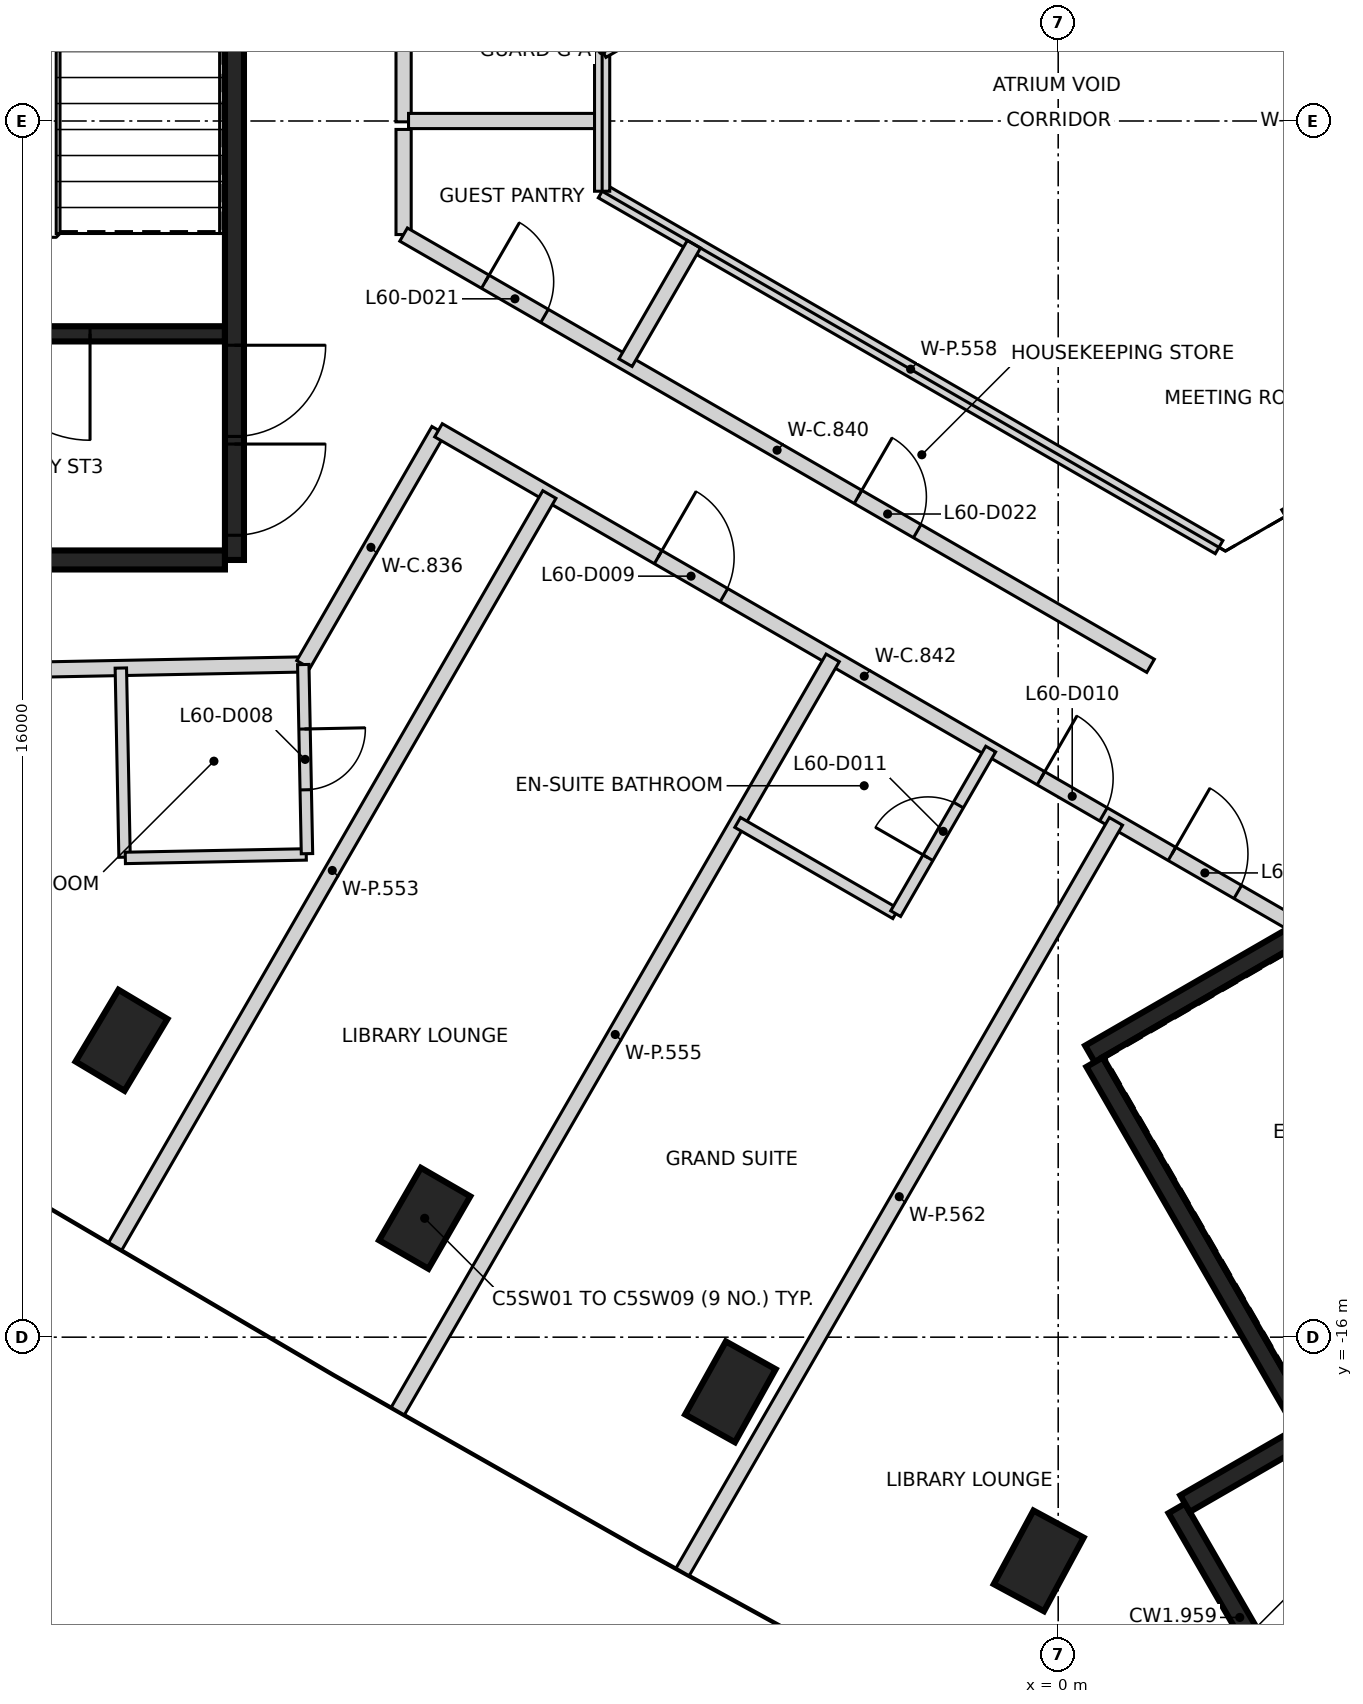
"""IFC4 building model, lengths in metres.
Left out: names, types, materials, properties, quantities, classifications, styles, units other than length and angle.
Written with IfcOpenShell. Run it as: python <this file> out.ifc"""

import sys

from ifc_helpers import new_model, si_unit, direction, frame, frame_2d, origin, origin_2d, place, context, subcontext, project, spatial, rectangle, extrude, element, fill, save


model = new_model("IFC4")
c1 = context("Model", 3, precision=1e-05, world=origin(), true_north=direction((0.0, 1.0)))
c2 = subcontext(c1, "Body", "Model", "MODEL_VIEW")
j1 = project(units=[si_unit("LENGTHUNIT", "METRE"), si_unit("PLANEANGLEUNIT", "RADIAN")], contexts=[c1])
p1 = place(None, origin())
s1 = spatial("IfcSite", under=j1, at=p1, CompositionType="ELEMENT")
p2 = place(p1, origin())
s2 = spatial("IfcBuilding", under=s1, at=p2, CompositionType="ELEMENT")
p3 = place(p2, frame((0.0, 0.0, 239.4)))
s3 = spatial("IfcBuildingStorey", under=s2, at=p3, CompositionType="ELEMENT", Elevation=239.4)
for number, where, z_axis, x_axis in (
    (1, (-12.323, -12.094, -0.35), (0.0, 0.0, 1.0), (0.513, 0.858, 0.0)),
    (2, (-8.335, -14.436, -0.35), (0.0, 0.0, 1.0), (0.5, 0.866, 0.0)),
    (3, (-4.312, -16.719, -0.35), (0.0, 0.0, 1.0), (0.487, 0.873, 0.0)),
    (4, (-0.256, -18.943, -0.35), (0.0, 0.0, 1.0), (0.475, 0.88, 0.0)),
):
    element("IfcColumn", number, at=place(p3, frame(where, z_axis=z_axis, x_axis=x_axis)), inside=s3, PredefinedType="COLUMN", context=c2, shape_type="SweptSolid", body=[
        extrude(rectangle(XDim=1.1, YDim=0.75, at=origin_2d()), origin(), (0.0, 0.0, 1.0), 3.6),
    ])
p4 = place(p3, frame((-10.837, 5.775, 0.0), z_axis=(0.0, 0.0, 1.0), x_axis=(0.0, -1.0, 0.0)))
e5 = element("IfcWall", 5, at=p4, inside=s3, PredefinedType="SHEAR", context=c2, shape_type="SweptSolid", body=[
    extrude(rectangle(XDim=11.55, YDim=0.25, at=frame_2d((5.775, 0.0))), origin(), (0.0, 0.0, 1.0), 3.25),
])
p5 = place(p4, frame((10.025, 0.0, 0.0)))
e6 = element("IfcOpeningElement", 6, at=p5, cuts=e5, PredefinedType="OPENING", context=c2, shape_type="SweptSolid", body=[
    extrude(rectangle(XDim=1.2, YDim=2.1, at=frame_2d((0.6, 1.05))), frame((0.0, 0.135, 0.0), z_axis=(0.0, -1.0, 0.0), x_axis=(1.0, 0.0, 0.0)), (0.0, 0.0, 1.0), 0.27),
])
p6 = place(p4, frame((8.725, 0.0, 0.0)))
e7 = element("IfcOpeningElement", 7, at=p6, cuts=e5, PredefinedType="OPENING", context=c2, shape_type="SweptSolid", body=[
    extrude(rectangle(XDim=1.2, YDim=2.1, at=frame_2d((0.6, 1.05))), frame((0.0, 0.135, 0.0), z_axis=(0.0, -1.0, 0.0), x_axis=(1.0, 0.0, 0.0)), (0.0, 0.0, 1.0), 0.27),
])
p7 = place(p3, frame((-10.963, -5.775, 0.0), z_axis=(0.0, 0.0, 1.0), x_axis=(-1.0, 0.0, 0.0)))
e8 = element("IfcWall", 8, at=p7, inside=s3, PredefinedType="SHEAR", context=c2, shape_type="SweptSolid", body=[
    extrude(rectangle(XDim=5.225, YDim=0.25, at=frame_2d((2.612, 0.0))), origin(), (0.0, 0.0, 1.0), 3.25),
])
p8 = place(p3, frame((-10.963, -2.8, 0.0), z_axis=(0.0, 0.0, 1.0), x_axis=(-1.0, 0.0, 0.0)))
e9 = element("IfcWall", 9, at=p8, inside=s3, PredefinedType="SHEAR", context=c2, shape_type="SweptSolid", body=[
    extrude(rectangle(XDim=5.098, YDim=0.2, at=frame_2d((2.549, 0.0))), origin(), (0.0, 0.0, 1.0), 3.25),
])
p9 = place(p8, frame((1.774, 0.0, 0.0)))
e10 = element("IfcOpeningElement", 10, at=p9, cuts=e9, PredefinedType="OPENING", context=c2, shape_type="SweptSolid", body=[
    extrude(rectangle(XDim=1.4, YDim=2.1, at=frame_2d((0.7, 1.05))), frame((0.0, 0.11, 0.0), z_axis=(0.0, -1.0, 0.0), x_axis=(1.0, 0.0, 0.0)), (0.0, 0.0, 1.0), 0.22),
])
p10 = place(p3, frame((0.417, -12.273, 0.0), z_axis=(0.0, 0.0, 1.0), x_axis=(0.866021906294, 0.500006057782, 0.0)))
e11 = element("IfcWall", 11, at=p10, inside=s3, PredefinedType="SHEAR", context=c2, shape_type="SweptSolid", body=[
    extrude(rectangle(XDim=11.55, YDim=0.25, at=frame_2d((5.775, 0.0))), origin(), (0.0, 0.0, 1.0), 3.25),
])
p11 = place(p10, frame((10.025, 0.0, 0.0)))
e12 = element("IfcOpeningElement", 12, at=p11, cuts=e11, PredefinedType="OPENING", context=c2, shape_type="SweptSolid", body=[
    extrude(rectangle(XDim=1.2, YDim=2.1, at=frame_2d((0.6, 1.05))), frame((0.0, 0.135, 0.0), z_axis=(0.0, -1.0, 0.0), x_axis=(1.0, 0.0, 0.0)), (0.0, 0.0, 1.0), 0.27),
])
p12 = place(p10, frame((8.725, 0.0, 0.0)))
e13 = element("IfcOpeningElement", 13, at=p12, cuts=e11, PredefinedType="OPENING", context=c2, shape_type="SweptSolid", body=[
    extrude(rectangle(XDim=1.2, YDim=2.1, at=frame_2d((0.6, 1.05))), frame((0.0, 0.135, 0.0), z_axis=(0.0, -1.0, 0.0), x_axis=(1.0, 0.0, 0.0)), (0.0, 0.0, 1.0), 0.27),
])
p13 = place(p3, frame((3.235, -17.153, 0.0), z_axis=(0.0, 0.0, 1.0), x_axis=(-0.500008851346, 0.866020293397, 0.0)))
e14 = element("IfcWall", 14, at=p13, inside=s3, PredefinedType="SHEAR", context=c2, shape_type="SweptSolid", body=[
    extrude(rectangle(XDim=5.51, YDim=0.25, at=frame_2d((2.755, 0.0))), origin(), (0.0, 0.0, 1.0), 3.25),
])
p14 = place(p3, frame((3.217, -21.122, 0.0), z_axis=(0.0, 0.0, 1.0), x_axis=(-0.499998874531, 0.866026053573, 0.0)))
e15 = element("IfcWall", 15, at=p14, inside=s3, PredefinedType="SHEAR", context=c2, shape_type="SweptSolid", body=[
    extrude(rectangle(XDim=3.313, YDim=0.25, at=frame_2d((1.656, 0.0))), origin(), (0.0, 0.0, 1.0), 3.25),
])
p15 = place(p3, frame((1.669, -18.19, 0.0), z_axis=(0.0, 0.0, 1.0), x_axis=(0.866042235819, 0.499970844928, 0.0)))
e16 = element("IfcWall", 16, at=p15, inside=s3, PredefinedType="SHEAR", context=c2, shape_type="SweptSolid", body=[
    extrude(rectangle(XDim=2.865, YDim=0.25, at=frame_2d((1.432, 0.0))), origin(), (0.0, 0.0, 1.0), 3.25),
])
p16 = place(p3, frame((-19.149, -7.329, 0.0), z_axis=(0.0, 0.0, 1.0), x_axis=(0.999810023919, 0.019491435849, 0.0)))
e17 = element("IfcWall", 17, at=p16, inside=s3, PredefinedType="PARTITIONING", context=c2, shape_type="SweptSolid", body=[
    extrude(rectangle(XDim=9.219, YDim=0.2, at=frame_2d((4.609, 0.0))), origin(), (0.0, 0.0, 1.0), 3.25),
])
p17 = place(p16, frame((3.23, 0.0, 0.0)))
e18 = element("IfcOpeningElement", 18, at=p17, cuts=e17, PredefinedType="OPENING", context=c2, shape_type="SweptSolid", body=[
    extrude(rectangle(XDim=0.95, YDim=2.1, at=frame_2d((0.475, 1.05))), frame((0.0, 0.11, 0.0), z_axis=(0.0, -1.0, 0.0), x_axis=(1.0, 0.0, 0.0)), (0.0, 0.0, 1.0), 0.22),
])
p18 = place(p3, frame((-9.931, -7.149, 0.0), z_axis=(0.0, 0.0, 1.0), x_axis=(0.499934418432, 0.86606326401, 0.0)))
e19 = element("IfcWall", 19, at=p18, inside=s3, PredefinedType="PARTITIONING", context=c2, shape_type="SweptSolid", body=[
    extrude(rectangle(XDim=3.556, YDim=0.2, at=frame_2d((1.778, 0.0))), origin(), (0.0, 0.0, 1.0), 3.25),
])
p19 = place(p3, frame((-8.612, -1.494, 0.0), z_axis=(0.0, 0.0, 1.0), x_axis=(0.0, 1.0, 0.0)))
e20 = element("IfcWall", 20, at=p19, inside=s3, PredefinedType="PARTITIONING", context=c2, shape_type="SweptSolid", body=[
    extrude(rectangle(XDim=1.383, YDim=0.2, at=frame_2d((0.691, 0.0))), origin(), (0.0, 0.0, 1.0), 3.25),
])
p20 = place(p3, frame((-8.612, -1.494, 0.0), z_axis=(0.0, 0.0, 1.0), x_axis=(0.866035468681, -0.499982566683, 0.0)))
e21 = element("IfcWall", 21, at=p20, inside=s3, PredefinedType="PARTITIONING", context=c2, shape_type="SweptSolid", body=[
    extrude(rectangle(XDim=11.348, YDim=0.2, at=frame_2d((5.674, 0.0))), origin(), (0.0, 0.0, 1.0), 3.25),
])
p21 = place(p20, frame((1.241, 0.0, 0.0)))
e22 = element("IfcOpeningElement", 22, at=p21, cuts=e21, PredefinedType="OPENING", context=c2, shape_type="SweptSolid", body=[
    extrude(rectangle(XDim=0.9, YDim=2.1, at=frame_2d((0.45, 1.05))), frame((0.0, 0.11, 0.0), z_axis=(0.0, -1.0, 0.0), x_axis=(1.0, 0.0, 0.0)), (0.0, 0.0, 1.0), 0.22),
])
p22 = place(p20, frame((6.903, 0.0, 0.0)))
e23 = element("IfcOpeningElement", 23, at=p22, cuts=e21, PredefinedType="OPENING", context=c2, shape_type="SweptSolid", body=[
    extrude(rectangle(XDim=0.9, YDim=2.1, at=frame_2d((0.45, 1.05))), frame((0.0, 0.11, 0.0), z_axis=(0.0, -1.0, 0.0), x_axis=(1.0, 0.0, 0.0)), (0.0, 0.0, 1.0), 0.22),
])
p23 = place(p3, frame((-8.612, -0.011, 0.0), z_axis=(0.0, 0.0, 1.0), x_axis=(0.0, 1.0, 0.0)))
e24 = element("IfcWall", 24, at=p23, inside=s3, PredefinedType="PARTITIONING", context=c2, shape_type="SweptSolid", body=[
    extrude(rectangle(XDim=1.505, YDim=0.2, at=frame_2d((0.752, 0.0))), origin(), (0.0, 0.0, 1.0), 3.25),
])
p24 = place(p3, frame((-8.153, -4.069, 0.0), z_axis=(0.0, 0.0, 1.0), x_axis=(0.865955522833, -0.500121017829, 0.0)))
e25 = element("IfcWall", 25, at=p24, inside=s3, PredefinedType="PARTITIONING", context=c2, shape_type="SweptSolid", body=[
    extrude(rectangle(XDim=12.937, YDim=0.2, at=frame_2d((6.469, 0.0))), origin(), (0.0, 0.0, 1.0), 3.25),
])
p25 = place(p24, frame((3.337, 0.0, 0.0)))
e26 = element("IfcOpeningElement", 26, at=p25, cuts=e25, PredefinedType="OPENING", context=c2, shape_type="SweptSolid", body=[
    extrude(rectangle(XDim=1.0, YDim=2.1, at=frame_2d((0.5, 1.05))), frame((0.0, 0.11, 0.0), z_axis=(0.0, -1.0, 0.0), x_axis=(1.0, 0.0, 0.0)), (0.0, 0.0, 1.0), 0.22),
])
p26 = place(p24, frame((9.153, 0.0, 0.0)))
e27 = element("IfcOpeningElement", 27, at=p26, cuts=e25, PredefinedType="OPENING", context=c2, shape_type="SweptSolid", body=[
    extrude(rectangle(XDim=0.95, YDim=2.1, at=frame_2d((0.475, 1.05))), frame((0.0, 0.11, 0.0), z_axis=(0.0, -1.0, 0.0), x_axis=(1.0, 0.0, 0.0)), (0.0, 0.0, 1.0), 0.22),
])
p27 = place(p24, frame((11.144, 0.0, 0.0)))
e28 = element("IfcOpeningElement", 28, at=p27, cuts=e25, PredefinedType="OPENING", context=c2, shape_type="SweptSolid", body=[
    extrude(rectangle(XDim=1.0, YDim=2.1, at=frame_2d((0.5, 1.05))), frame((0.0, 0.11, 0.0), z_axis=(0.0, -1.0, 0.0), x_axis=(1.0, 0.0, 0.0)), (0.0, 0.0, 1.0), 0.22),
])
p28 = place(p3, frame((-12.407, -14.806, 0.0), z_axis=(0.0, 0.0, 1.0), x_axis=(0.500104175471, 0.865965249693, 0.0)))
e29 = element("IfcWall", 29, at=p28, inside=s3, PredefinedType="PARTITIONING", context=c2, shape_type="SweptSolid", body=[
    extrude(rectangle(XDim=11.423, YDim=0.2, at=frame_2d((5.711, 0.0))), origin(), (0.0, 0.0, 1.0), 2.35),
])
p29 = place(p3, frame((-8.688, -16.973, 0.0), z_axis=(0.0, 0.0, 1.0), x_axis=(0.500021643343, 0.866012907634, 0.0)))
e30 = element("IfcWall", 30, at=p29, inside=s3, PredefinedType="PARTITIONING", context=c2, shape_type="SweptSolid", body=[
    extrude(rectangle(XDim=11.443, YDim=0.2, at=frame_2d((5.721, 0.0))), origin(), (0.0, 0.0, 1.0), 2.35),
])
p30 = place(p3, frame((-8.547, 0.0, 0.0), z_axis=(0.0, 0.0, 1.0), x_axis=(1.0, 0.0, 0.0)))
e31 = element("IfcWall", 31, at=p30, inside=s3, PredefinedType="PARTITIONING", context=c2, shape_type="SweptSolid", body=[
    extrude(rectangle(XDim=2.547, YDim=0.2, at=frame_2d((1.273, 0.0))), origin(), (0.0, 0.0, 1.0), 3.25),
])
p31 = place(p3, frame((-6.0, -0.924, 0.0), z_axis=(0.0, 0.0, 1.0), x_axis=(0.866223755075, -0.499656288007, 0.0)))
e32 = element("IfcWall", 32, at=p31, inside=s3, PredefinedType="PARTITIONING", context=c2, shape_type="SweptSolid", body=[
    extrude(rectangle(XDim=9.37, YDim=0.2, at=frame_2d((4.685, 0.0))), origin(), (0.0, 0.0, 1.0), 3.25),
])
p32 = place(p3, frame((-6.0, -0.924, 0.0), z_axis=(0.0, 0.0, 1.0), x_axis=(0.0, 1.0, 0.0)))
e33 = element("IfcWall", 33, at=p32, inside=s3, PredefinedType="PARTITIONING", context=c2, shape_type="SweptSolid", body=[
    extrude(rectangle(XDim=1.848, YDim=0.2, at=frame_2d((0.924, 0.0))), origin(), (0.0, 0.0, 1.0), 3.25),
])
p33 = place(p3, frame((-6.0, 0.924, 0.0), z_axis=(0.0, 0.0, 1.0), x_axis=(0.866012967051, 0.500021540435, 0.0)))
e34 = element("IfcWall", 34, at=p33, inside=s3, PredefinedType="PARTITIONING", context=c2, shape_type="SweptSolid", body=[
    extrude(rectangle(XDim=9.468, YDim=0.2, at=frame_2d((4.734, 0.0))), origin(), (0.0, 0.0, 1.0), 3.25),
])
p34 = place(p3, frame((-5.692, -3.179, 0.0), z_axis=(0.0, 0.0, 1.0), x_axis=(0.500164619231, 0.865930339964, 0.0)))
e35 = element("IfcWall", 35, at=p34, inside=s3, PredefinedType="PARTITIONING", context=c2, shape_type="SweptSolid", body=[
    extrude(rectangle(XDim=1.8, YDim=0.2, at=frame_2d((0.9, 0.0))), origin(), (0.0, 0.0, 1.0), 3.25),
])
p35 = place(p3, frame((-4.942, -19.089, 0.0), z_axis=(0.0, 0.0, 1.0), x_axis=(0.500021458202, 0.866013014531, 0.0)))
e36 = element("IfcWall", 36, at=p35, inside=s3, PredefinedType="PARTITIONING", context=c2, shape_type="SweptSolid", body=[
    extrude(rectangle(XDim=11.403, YDim=0.2, at=frame_2d((5.701, 0.0))), origin(), (0.0, 0.0, 1.0), 2.35),
])
p36 = place(p3, frame((2.99, -5.202, 0.0), z_axis=(0.0, 0.0, 1.0), x_axis=(0.865872609263, 0.500264554538, 0.0)))
e37 = element("IfcWall", 37, at=p36, inside=s3, PredefinedType="PARTITIONING", context=c2, shape_type="SweptSolid", body=[
    extrude(rectangle(XDim=0.936, YDim=0.2, at=frame_2d((0.468, 0.0))), origin(), (0.0, 0.0, 1.0), 3.25),
])
p37 = place(p3, frame((-12.332, -7.197, 0.0), z_axis=(0.0, 0.0, 1.0), x_axis=(0.019719450113, -0.999805552739, 0.0)))
e38 = element("IfcWall", 38, at=p37, inside=s3, PredefinedType="PARTITIONING", context=c2, shape_type="SweptSolid", body=[
    extrude(rectangle(XDim=2.489, YDim=0.15, at=frame_2d((1.244, 0.0))), origin(), (0.0, 0.0, 1.0), 3.25),
])
p38 = place(p3, frame((-12.273, -9.695, 0.0), z_axis=(0.0, 0.0, 1.0), x_axis=(0.999812094216, 0.019384949303, 0.0)))
e39 = element("IfcWall", 39, at=p38, inside=s3, PredefinedType="PARTITIONING", context=c2, shape_type="SweptSolid", body=[
    extrude(rectangle(XDim=2.38, YDim=0.15, at=frame_2d((1.19, 0.0))), origin(), (0.0, 0.0, 1.0), 3.25),
])
p39 = place(p3, frame((-9.932, -7.151, 0.0), z_axis=(0.0, 0.0, 1.0), x_axis=(0.019621381261, -0.999807482167, 0.0)))
e40 = element("IfcWall", 40, at=p39, inside=s3, PredefinedType="PARTITIONING", context=c2, shape_type="SweptSolid", body=[
    extrude(rectangle(XDim=2.489, YDim=0.15, at=frame_2d((1.244, 0.0))), origin(), (0.0, 0.0, 1.0), 3.25),
])
p40 = place(p39, frame((0.848, 0.0, 0.0)))
e41 = element("IfcOpeningElement", 41, at=p40, cuts=e40, PredefinedType="OPENING", context=c2, shape_type="SweptSolid", body=[
    extrude(rectangle(XDim=0.8, YDim=2.1, at=frame_2d((0.4, 1.05))), frame((0.0, 0.085, 0.0), z_axis=(0.0, -1.0, 0.0), x_axis=(1.0, 0.0, 0.0)), (0.0, 0.0, 1.0), 0.17),
])
p41 = place(p3, frame((-4.217, -9.228, 0.0), z_axis=(0.0, 0.0, 1.0), x_axis=(0.866100915363, -0.499869187296, 0.0)))
e42 = element("IfcWall", 42, at=p41, inside=s3, PredefinedType="PARTITIONING", context=c2, shape_type="SweptSolid", body=[
    extrude(rectangle(XDim=2.401, YDim=0.15, at=frame_2d((1.2, 0.0))), origin(), (0.0, 0.0, 1.0), 3.25),
])
p42 = place(p3, frame((-2.138, -10.428, 0.0), z_axis=(0.0, 0.0, 1.0), x_axis=(0.500004234368, 0.866022959057, 0.0)))
e43 = element("IfcWall", 43, at=p42, inside=s3, PredefinedType="PARTITIONING", context=c2, shape_type="SweptSolid", body=[
    extrude(rectangle(XDim=2.5, YDim=0.15, at=frame_2d((1.25, 0.0))), origin(), (0.0, 0.0, 1.0), 3.25),
])
p43 = place(p42, frame((0.85, 0.0, 0.0)))
e44 = element("IfcOpeningElement", 44, at=p43, cuts=e43, PredefinedType="OPENING", context=c2, shape_type="SweptSolid", body=[
    extrude(rectangle(XDim=0.8, YDim=2.1, at=frame_2d((0.4, 1.05))), frame((0.0, 0.085, 0.0), z_axis=(0.0, -1.0, 0.0), x_axis=(1.0, 0.0, 0.0)), (0.0, 0.0, 1.0), 0.17),
])
p44 = place(p5, origin())
e45 = element("IfcDoor", 45, at=p44, inside=s3, OperationType="SINGLE_SWING_LEFT", PredefinedType="DOOR", context=c2, shape_type="SweptSolid", body=[
    extrude(rectangle(XDim=1.2, YDim=2.1, at=frame_2d((0.6, 1.05))), frame((0.0, 0.025, 0.0), z_axis=(0.0, -1.0, 0.0), x_axis=(1.0, 0.0, 0.0)), (0.0, 0.0, 1.0), 0.05),
])
fill(e6, e45)
p45 = place(p6, origin())
e46 = element("IfcDoor", 46, at=p45, inside=s3, OperationType="SINGLE_SWING_RIGHT", PredefinedType="DOOR", context=c2, shape_type="SweptSolid", body=[
    extrude(rectangle(XDim=1.2, YDim=2.1, at=frame_2d((0.6, 1.05))), frame((0.0, 0.025, 0.0), z_axis=(0.0, -1.0, 0.0), x_axis=(1.0, 0.0, 0.0)), (0.0, 0.0, 1.0), 0.05),
])
fill(e7, e46)
p46 = place(p9, origin())
e47 = element("IfcDoor", 47, at=p46, inside=s3, OperationType="SINGLE_SWING_LEFT", PredefinedType="DOOR", context=c2, shape_type="SweptSolid", body=[
    extrude(rectangle(XDim=1.4, YDim=2.1, at=frame_2d((0.7, 1.05))), frame((0.0, 0.025, 0.0), z_axis=(0.0, -1.0, 0.0), x_axis=(1.0, 0.0, 0.0)), (0.0, 0.0, 1.0), 0.05),
])
fill(e10, e47)
p47 = place(p40, frame((0.8, 0.0, 0.0), z_axis=(0.0, 0.0, 1.0), x_axis=(-1.0, 0.0, 0.0)))
e48 = element("IfcDoor", 48, at=p47, inside=s3, OperationType="SINGLE_SWING_LEFT", PredefinedType="DOOR", context=c2, shape_type="SweptSolid", body=[
    extrude(rectangle(XDim=0.8, YDim=2.1, at=frame_2d((0.4, 1.05))), frame((0.0, 0.025, 0.0), z_axis=(0.0, -1.0, 0.0), x_axis=(1.0, 0.0, 0.0)), (0.0, 0.0, 1.0), 0.05),
])
fill(e41, e48)
p48 = place(p25, frame((1.0, 0.0, 0.0), z_axis=(0.0, 0.0, 1.0), x_axis=(-1.0, 0.0, 0.0)))
e49 = element("IfcDoor", 49, at=p48, inside=s3, OperationType="SINGLE_SWING_LEFT", PredefinedType="DOOR", context=c2, shape_type="SweptSolid", body=[
    extrude(rectangle(XDim=1.0, YDim=2.1, at=frame_2d((0.5, 1.05))), frame((0.0, 0.025, 0.0), z_axis=(0.0, -1.0, 0.0), x_axis=(1.0, 0.0, 0.0)), (0.0, 0.0, 1.0), 0.05),
])
fill(e26, e49)
p49 = place(p26, frame((0.95, 0.0, 0.0), z_axis=(0.0, 0.0, 1.0), x_axis=(-1.0, 0.0, 0.0)))
e50 = element("IfcDoor", 50, at=p49, inside=s3, OperationType="SINGLE_SWING_LEFT", PredefinedType="DOOR", context=c2, shape_type="SweptSolid", body=[
    extrude(rectangle(XDim=0.95, YDim=2.1, at=frame_2d((0.475, 1.05))), frame((0.0, 0.025, 0.0), z_axis=(0.0, -1.0, 0.0), x_axis=(1.0, 0.0, 0.0)), (0.0, 0.0, 1.0), 0.05),
])
fill(e27, e50)
p50 = place(p43, origin())
e51 = element("IfcDoor", 51, at=p50, inside=s3, OperationType="SINGLE_SWING_LEFT", PredefinedType="DOOR", context=c2, shape_type="SweptSolid", body=[
    extrude(rectangle(XDim=0.8, YDim=2.1, at=frame_2d((0.4, 1.05))), frame((0.0, 0.025, 0.0), z_axis=(0.0, -1.0, 0.0), x_axis=(1.0, 0.0, 0.0)), (0.0, 0.0, 1.0), 0.05),
])
fill(e44, e51)
p51 = place(p27, frame((1.0, 0.0, 0.0), z_axis=(0.0, 0.0, 1.0), x_axis=(-1.0, 0.0, 0.0)))
e52 = element("IfcDoor", 52, at=p51, inside=s3, OperationType="SINGLE_SWING_LEFT", PredefinedType="DOOR", context=c2, shape_type="SweptSolid", body=[
    extrude(rectangle(XDim=1.0, YDim=2.1, at=frame_2d((0.5, 1.05))), frame((0.0, 0.025, 0.0), z_axis=(0.0, -1.0, 0.0), x_axis=(1.0, 0.0, 0.0)), (0.0, 0.0, 1.0), 0.05),
])
fill(e28, e52)
p52 = place(p21, origin())
e53 = element("IfcDoor", 53, at=p52, inside=s3, OperationType="SINGLE_SWING_LEFT", PredefinedType="DOOR", context=c2, shape_type="SweptSolid", body=[
    extrude(rectangle(XDim=0.9, YDim=2.1, at=frame_2d((0.45, 1.05))), frame((0.0, 0.025, 0.0), z_axis=(0.0, -1.0, 0.0), x_axis=(1.0, 0.0, 0.0)), (0.0, 0.0, 1.0), 0.05),
])
fill(e22, e53)
p53 = place(p22, origin())
e54 = element("IfcDoor", 54, at=p53, inside=s3, OperationType="SINGLE_SWING_LEFT", PredefinedType="DOOR", context=c2, shape_type="SweptSolid", body=[
    extrude(rectangle(XDim=0.9, YDim=2.1, at=frame_2d((0.45, 1.05))), frame((0.0, 0.025, 0.0), z_axis=(0.0, -1.0, 0.0), x_axis=(1.0, 0.0, 0.0)), (0.0, 0.0, 1.0), 0.05),
])
fill(e23, e54)
save(model, sys.argv[1])
